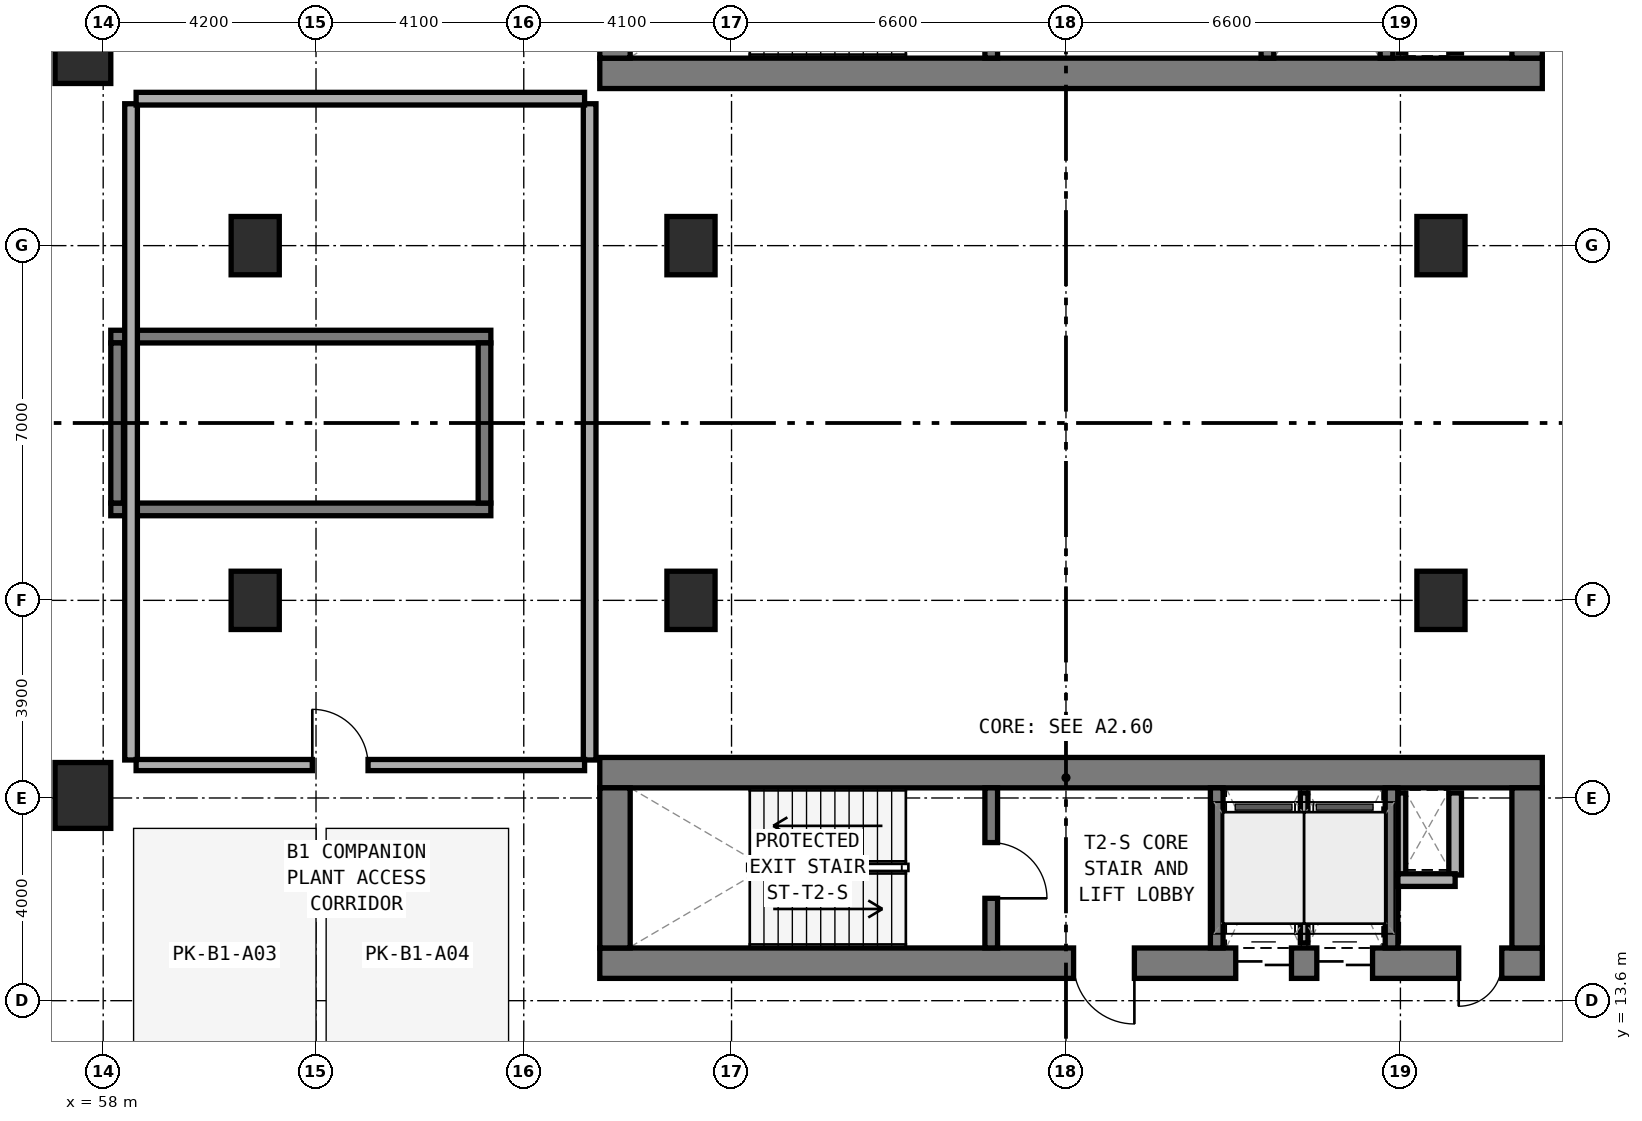
"""IFC4 building model, lengths in metres.
Left out: names, types, materials, properties, quantities, classifications, styles, units other than length and angle.
Written with IfcOpenShell. Run it as: python <this file> out.ifc"""

import sys

from ifc_helpers import new_model, si_unit, direction, frame, frame_2d, origin, origin_2d, place, context, subcontext, project, spatial, rectangle, extrude, element, fill, save


model = new_model("IFC4")
c1 = context("Model", 3, precision=1e-05, world=origin(), true_north=direction((0.0, 1.0)))
c2 = subcontext(c1, "Body", "Model", "MODEL_VIEW")
j1 = project(units=[si_unit("LENGTHUNIT", "METRE"), si_unit("PLANEANGLEUNIT", "RADIAN")], contexts=[c1])
p1 = place(None, origin())
s1 = spatial("IfcSite", under=j1, at=p1, CompositionType="ELEMENT")
p2 = place(p1, origin())
s2 = spatial("IfcBuilding", under=s1, at=p2, CompositionType="ELEMENT")
p3 = place(p2, frame((0.0, 0.0, -4.2)))
s3 = spatial("IfcBuildingStorey", under=s2, at=p3, CompositionType="ELEMENT", Elevation=-4.2)
p4 = place(p3, frame((67.8, 31.9, 0.0), z_axis=(0.0, 0.0, 1.0), x_axis=(1.0, 0.0, 0.0)))
e1 = element("IfcWall", 1, at=p4, inside=s3, PredefinedType="SHEAR", context=c2, shape_type="SweptSolid", body=[
    extrude(rectangle(XDim=18.6, YDim=0.6, at=frame_2d((9.3, 0.0))), origin(), (0.0, 0.0, 1.0), 4.2),
])
for number, where, z_axis, x_axis in (
    (2, (68.1, 32.2, 0.0), (0.0, 0.0, 1.0), (0.0, 1.0, 0.0)),
    (3, (86.1, 32.2, 0.0), (0.0, 0.0, 1.0), (0.0, 1.0, 0.0)),
):
    element("IfcWall", number, at=place(p3, frame(where, z_axis=z_axis, x_axis=x_axis)), inside=s3, PredefinedType="SHEAR", context=c2, shape_type="SweptSolid", body=[
        extrude(rectangle(XDim=3.16, YDim=0.6, at=frame_2d((1.58, 0.0))), origin(), (0.0, 0.0, 1.0), 4.2),
    ])
p5 = place(p3, frame((75.525, 32.2, 0.0), z_axis=(0.0, 0.0, 1.0), x_axis=(0.0, 1.0, 0.0)))
e4 = element("IfcWall", 4, at=p5, inside=s3, PredefinedType="STANDARD", context=c2, shape_type="SweptSolid", body=[
    extrude(rectangle(XDim=3.16, YDim=0.25, at=frame_2d((1.58, 0.0))), origin(), (0.0, 0.0, 1.0), 3.85),
])
p6 = place(p5, frame((0.98, 0.0, 0.0)))
e5 = element("IfcOpeningElement", 5, at=p6, cuts=e4, PredefinedType="OPENING", context=c2, shape_type="SweptSolid", body=[
    extrude(rectangle(XDim=1.1, YDim=2.15, at=frame_2d((0.55, 1.075))), frame((0.0, 0.135, 0.0), z_axis=(0.0, -1.0, 0.0), x_axis=(1.0, 0.0, 0.0)), (0.0, 0.0, 1.0), 0.27),
])
p7 = place(p3, frame((80.975, 32.2, 0.0), z_axis=(0.0, 0.0, 1.0), x_axis=(0.0, 1.0, 0.0)))
e6 = element("IfcWall", 6, at=p7, inside=s3, PredefinedType="STANDARD", context=c2, shape_type="SweptSolid", body=[
    extrude(rectangle(XDim=3.16, YDim=0.25, at=frame_2d((1.58, 0.0))), origin(), (0.0, 0.0, 1.0), 3.85),
])
p8 = place(p7, frame((0.98, 0.0, 0.0)))
e7 = element("IfcOpeningElement", 7, at=p8, cuts=e6, PredefinedType="OPENING", context=c2, shape_type="SweptSolid", body=[
    extrude(rectangle(XDim=1.1, YDim=2.15, at=frame_2d((0.55, 1.075))), frame((0.0, 0.135, 0.0), z_axis=(0.0, -1.0, 0.0), x_axis=(1.0, 0.0, 0.0)), (0.0, 0.0, 1.0), 0.27),
])
p9 = place(p3, frame((83.325, 32.2, 0.0), z_axis=(0.0, 0.0, 1.0), x_axis=(0.0, 1.0, 0.0)))
e8 = element("IfcWall", 8, at=p9, inside=s3, PredefinedType="STANDARD", context=c2, shape_type="SweptSolid", body=[
    extrude(rectangle(XDim=3.16, YDim=0.25, at=frame_2d((1.58, 0.0))), origin(), (0.0, 0.0, 1.0), 3.85),
])
p10 = place(p3, frame((67.8, 14.34, 0.0), z_axis=(0.0, 0.0, 1.0), x_axis=(1.0, 0.0, 0.0)))
e9 = element("IfcWall", 9, at=p10, inside=s3, PredefinedType="SHEAR", context=c2, shape_type="SweptSolid", body=[
    extrude(rectangle(XDim=18.6, YDim=0.6, at=frame_2d((9.3, 0.0))), origin(), (0.0, 0.0, 1.0), 4.2),
])
p11 = place(p10, frame((9.35, 0.0, 0.0)))
e10 = element("IfcOpeningElement", 10, at=p11, cuts=e9, PredefinedType="OPENING", context=c2, shape_type="SweptSolid", body=[
    extrude(rectangle(XDim=1.2, YDim=2.15, at=frame_2d((0.6, 1.075))), frame((0.0, 0.31, 0.0), z_axis=(0.0, -1.0, 0.0), x_axis=(1.0, 0.0, 0.0)), (0.0, 0.0, 1.0), 0.62),
])
p12 = place(p10, frame((16.95, 0.0, 0.0)))
e11 = element("IfcOpeningElement", 11, at=p12, cuts=e9, PredefinedType="OPENING", context=c2, shape_type="SweptSolid", body=[
    extrude(rectangle(XDim=0.85, YDim=2.1, at=frame_2d((0.425, 1.05))), frame((0.0, 0.31, 0.0), z_axis=(0.0, -1.0, 0.0), x_axis=(1.0, 0.0, 0.0)), (0.0, 0.0, 1.0), 0.62),
])
p13 = place(p10, frame((12.55, 0.0, 0.0)))
e12 = element("IfcOpeningElement", 12, at=p13, cuts=e9, PredefinedType="OPENING", context=c2, shape_type="SweptSolid", body=[
    extrude(rectangle(XDim=1.1, YDim=2.15, at=frame_2d((0.55, 1.075))), frame((0.0, 0.31, 0.0), z_axis=(0.0, -1.0, 0.0), x_axis=(1.0, 0.0, 0.0)), (0.0, 0.0, 1.0), 0.62),
])
p14 = place(p10, frame((14.15, 0.0, 0.0)))
e13 = element("IfcOpeningElement", 13, at=p14, cuts=e9, PredefinedType="OPENING", context=c2, shape_type="SweptSolid", body=[
    extrude(rectangle(XDim=1.1, YDim=2.15, at=frame_2d((0.55, 1.075))), frame((0.0, 0.31, 0.0), z_axis=(0.0, -1.0, 0.0), x_axis=(1.0, 0.0, 0.0)), (0.0, 0.0, 1.0), 0.62),
])
p15 = place(p3, frame((67.8, 18.1, 0.0), z_axis=(0.0, 0.0, 1.0), x_axis=(1.0, 0.0, 0.0)))
e14 = element("IfcWall", 14, at=p15, inside=s3, PredefinedType="SHEAR", context=c2, shape_type="SweptSolid", body=[
    extrude(rectangle(XDim=18.6, YDim=0.6, at=frame_2d((9.3, 0.0))), origin(), (0.0, 0.0, 1.0), 4.2),
])
for number, where, z_axis, x_axis in (
    (15, (68.1, 14.64, 0.0), (0.0, 0.0, 1.0), (0.0, 1.0, 0.0)),
    (16, (86.1, 14.64, 0.0), (0.0, 0.0, 1.0), (0.0, 1.0, 0.0)),
):
    element("IfcWall", number, at=place(p3, frame(where, z_axis=z_axis, x_axis=x_axis)), inside=s3, PredefinedType="SHEAR", context=c2, shape_type="SweptSolid", body=[
        extrude(rectangle(XDim=3.16, YDim=0.6, at=frame_2d((1.58, 0.0))), origin(), (0.0, 0.0, 1.0), 4.2),
    ])
p16 = place(p3, frame((75.525, 14.64, 0.0), z_axis=(0.0, 0.0, 1.0), x_axis=(0.0, 1.0, 0.0)))
e17 = element("IfcWall", 17, at=p16, inside=s3, PredefinedType="STANDARD", context=c2, shape_type="SweptSolid", body=[
    extrude(rectangle(XDim=3.16, YDim=0.25, at=frame_2d((1.58, 0.0))), origin(), (0.0, 0.0, 1.0), 3.85),
])
p17 = place(p16, frame((0.98, 0.0, 0.0)))
e18 = element("IfcOpeningElement", 18, at=p17, cuts=e17, PredefinedType="OPENING", context=c2, shape_type="SweptSolid", body=[
    extrude(rectangle(XDim=1.1, YDim=2.15, at=frame_2d((0.55, 1.075))), frame((0.0, 0.135, 0.0), z_axis=(0.0, -1.0, 0.0), x_axis=(1.0, 0.0, 0.0)), (0.0, 0.0, 1.0), 0.27),
])
for number, where, z_axis, x_axis in (
    (19, (79.975, 14.64, 0.0), (0.0, 0.0, 1.0), (0.0, 1.0, 0.0)),
    (20, (83.425, 14.64, 0.0), (0.0, 0.0, 1.0), (0.0, 1.0, 0.0)),
):
    element("IfcWall", number, at=place(p3, frame(where, z_axis=z_axis, x_axis=x_axis)), inside=s3, PredefinedType="STANDARD", context=c2, shape_type="SweptSolid", body=[
        extrude(rectangle(XDim=3.16, YDim=0.25, at=frame_2d((1.58, 0.0))), origin(), (0.0, 0.0, 1.0), 3.85),
    ])
for number, where, z_axis, x_axis in (
    (21, (58.15, 23.295, 0.0), (0.0, 0.0, 1.0), (1.0, 0.0, 0.0)),
    (22, (58.15, 26.705, 0.0), (0.0, 0.0, 1.0), (1.0, 0.0, 0.0)),
):
    element("IfcWall", number, at=place(p3, frame(where, z_axis=z_axis, x_axis=x_axis)), inside=s3, PredefinedType="STANDARD", context=c2, shape_type="SweptSolid", body=[
        extrude(rectangle(XDim=7.5, YDim=0.25, at=frame_2d((3.75, 0.0))), origin(), (0.0, 0.0, 1.0), 4.2),
    ])
for number, where, z_axis, x_axis in (
    (23, (58.275, 23.42, 0.0), (0.0, 0.0, 1.0), (0.0, 1.0, 0.0)),
    (24, (65.525, 23.42, 0.0), (0.0, 0.0, 1.0), (0.0, 1.0, 0.0)),
):
    element("IfcWall", number, at=place(p3, frame(where, z_axis=z_axis, x_axis=x_axis)), inside=s3, PredefinedType="STANDARD", context=c2, shape_type="SweptSolid", body=[
        extrude(rectangle(XDim=3.16, YDim=0.25, at=frame_2d((1.58, 0.0))), origin(), (0.0, 0.0, 1.0), 4.2),
    ])
for number, where, z_axis, x_axis in (
    (25, (61.0, 21.5, 0.0), (0.0, 0.0, 1.0), (1.0, 0.0, 0.0)),
    (26, (61.0, 28.5, 0.0), (0.0, 0.0, 1.0), (1.0, 0.0, 0.0)),
    (27, (69.6, 21.5, 0.0), (0.0, 0.0, 1.0), (1.0, 0.0, 0.0)),
    (28, (69.6, 28.5, 0.0), (0.0, 0.0, 1.0), (1.0, 0.0, 0.0)),
    (29, (84.4, 21.5, 0.0), (0.0, 0.0, 1.0), (1.0, 0.0, 0.0)),
    (30, (84.4, 28.5, 0.0), (0.0, 0.0, 1.0), (1.0, 0.0, 0.0)),
):
    element("IfcColumn", number, at=place(p3, frame(where, z_axis=z_axis, x_axis=x_axis)), inside=s3, PredefinedType="COLUMN", context=c2, shape_type="SweptSolid", body=[
        extrude(rectangle(XDim=0.95, YDim=1.15, at=origin_2d()), origin(), (0.0, 0.0, 1.0), 4.2),
    ])
for number, where, z_axis, x_axis in (
    (31, (57.6, 17.65, 0.0), (0.0, 0.0, 1.0), (1.0, 0.0, 0.0)),
    (32, (57.6, 32.35, 0.0), (0.0, 0.0, 1.0), (1.0, 0.0, 0.0)),
):
    element("IfcColumn", number, at=place(p3, frame(where, z_axis=z_axis, x_axis=x_axis)), inside=s3, PredefinedType="COLUMN", context=c2, shape_type="SweptSolid", body=[
        extrude(rectangle(XDim=1.1, YDim=1.3, at=origin_2d()), origin(), (0.0, 0.0, 1.0), 4.2),
    ])
p18 = place(p3, frame((83.63, 32.3, 0.0), z_axis=(0.0, 0.0, 1.0), x_axis=(0.0, 1.0, 0.0)))
e33 = element("IfcWall", 33, at=p18, inside=s3, PredefinedType="PARTITIONING", context=c2, shape_type="SweptSolid", body=[
    extrude(rectangle(XDim=1.62, YDim=0.15, at=frame_2d((0.81, 0.0))), origin(), (0.0, 0.0, 1.0), 3.325),
])
p19 = place(p3, frame((84.68, 32.3, 0.0), z_axis=(0.0, 0.0, 1.0), x_axis=(0.0, 1.0, 0.0)))
e34 = element("IfcWall", 34, at=p19, inside=s3, PredefinedType="SOLIDWALL", context=c2, shape_type="SweptSolid", body=[
    extrude(rectangle(XDim=1.62, YDim=0.25, at=frame_2d((0.81, 0.0))), origin(), (0.0, 0.0, 1.0), 3.85),
])
p20 = place(p3, frame((83.63, 16.08, 0.0), z_axis=(0.0, 0.0, 1.0), x_axis=(0.0, 1.0, 0.0)))
e35 = element("IfcWall", 35, at=p20, inside=s3, PredefinedType="PARTITIONING", context=c2, shape_type="SweptSolid", body=[
    extrude(rectangle(XDim=1.62, YDim=0.15, at=frame_2d((0.81, 0.0))), origin(), (0.0, 0.0, 1.0), 3.325),
])
p21 = place(p3, frame((84.68, 16.08, 0.0), z_axis=(0.0, 0.0, 1.0), x_axis=(0.0, 1.0, 0.0)))
e36 = element("IfcWall", 36, at=p21, inside=s3, PredefinedType="SOLIDWALL", context=c2, shape_type="SweptSolid", body=[
    extrude(rectangle(XDim=1.62, YDim=0.25, at=frame_2d((0.81, 0.0))), origin(), (0.0, 0.0, 1.0), 3.85),
])
p22 = place(p3, frame((83.55, 15.98, 0.0), z_axis=(0.0, 0.0, 1.0), x_axis=(1.0, 0.0, 0.0)))
e37 = element("IfcWall", 37, at=p22, inside=s3, PredefinedType="SOLIDWALL", context=c2, shape_type="SweptSolid", body=[
    extrude(rectangle(XDim=1.13, YDim=0.25, at=frame_2d((0.565, 0.0))), origin(), (0.0, 0.0, 1.0), 3.85),
])
p23 = place(p3, frame((81.7, 14.74, 0.0), z_axis=(0.0, 0.0, 1.0), x_axis=(0.0, 1.0, 0.0)))
e38 = element("IfcWall", 38, at=p23, inside=s3, PredefinedType="PARTITIONING", context=c2, shape_type="SweptSolid", body=[
    extrude(rectangle(XDim=2.96, YDim=0.15, at=frame_2d((1.48, 0.0))), origin(), (0.0, 0.0, 1.0), 3.85),
])
p24 = place(p3, frame((58.55, 18.35, 0.0), z_axis=(0.0, 0.0, 1.0), x_axis=(0.0, 1.0, 0.0)))
e39 = element("IfcWall", 39, at=p24, inside=s3, PredefinedType="SOLIDWALL", context=c2, shape_type="SweptSolid", body=[
    extrude(rectangle(XDim=12.95, YDim=0.25, at=frame_2d((6.475, 0.0))), origin(), (0.0, 0.0, 1.0), 3.85),
])
p25 = place(p3, frame((67.6, 18.35, 0.0), z_axis=(0.0, 0.0, 1.0), x_axis=(0.0, 1.0, 0.0)))
e40 = element("IfcWall", 40, at=p25, inside=s3, PredefinedType="SOLIDWALL", context=c2, shape_type="SweptSolid", body=[
    extrude(rectangle(XDim=12.95, YDim=0.25, at=frame_2d((6.475, 0.0))), origin(), (0.0, 0.0, 1.0), 3.325),
])
p26 = place(p3, frame((58.65, 31.4, 0.0), z_axis=(0.0, 0.0, 1.0), x_axis=(1.0, 0.0, 0.0)))
e41 = element("IfcWall", 41, at=p26, inside=s3, PredefinedType="SOLIDWALL", context=c2, shape_type="SweptSolid", body=[
    extrude(rectangle(XDim=8.85, YDim=0.25, at=frame_2d((4.425, 0.0))), origin(), (0.0, 0.0, 1.0), 3.465),
])
p27 = place(p3, frame((58.65, 18.25, 0.0), z_axis=(0.0, 0.0, 1.0), x_axis=(1.0, 0.0, 0.0)))
e42 = element("IfcWall", 42, at=p27, inside=s3, PredefinedType="SOLIDWALL", context=c2, shape_type="SweptSolid", body=[
    extrude(rectangle(XDim=8.85, YDim=0.22, at=frame_2d((4.425, 0.0))), origin(), (0.0, 0.0, 1.0), 3.465),
])
p28 = place(p27, frame((3.477, 0.0, 0.0)))
e43 = element("IfcOpeningElement", 43, at=p28, cuts=e42, PredefinedType="OPENING", context=c2, shape_type="SweptSolid", body=[
    extrude(rectangle(XDim=1.1, YDim=2.1, at=frame_2d((0.55, 1.05))), frame((0.0, 0.12, 0.0), z_axis=(0.0, -1.0, 0.0), x_axis=(1.0, 0.0, 0.0)), (0.0, 0.0, 1.0), 0.24),
])
p29 = place(p17, frame((1.1, 0.0, 0.0), z_axis=(0.0, 0.0, 1.0), x_axis=(-1.0, 0.0, 0.0)))
e44 = element("IfcDoor", 44, at=p29, inside=s3, OperationType="SINGLE_SWING_RIGHT", PredefinedType="DOOR", context=c2, shape_type="SweptSolid", body=[
    extrude(rectangle(XDim=1.1, YDim=2.15, at=frame_2d((0.55, 1.075))), frame((0.0, 0.025, 0.0), z_axis=(0.0, -1.0, 0.0), x_axis=(1.0, 0.0, 0.0)), (0.0, 0.0, 1.0), 0.05),
])
fill(e18, e44)
p30 = place(p11, frame((1.2, 0.0, 0.0), z_axis=(0.0, 0.0, 1.0), x_axis=(-1.0, 0.0, 0.0)))
e45 = element("IfcDoor", 45, at=p30, inside=s3, OperationType="SINGLE_SWING_LEFT", PredefinedType="DOOR", context=c2, shape_type="SweptSolid", body=[
    extrude(rectangle(XDim=1.2, YDim=2.15, at=frame_2d((0.6, 1.075))), frame((0.0, 0.025, 0.0), z_axis=(0.0, -1.0, 0.0), x_axis=(1.0, 0.0, 0.0)), (0.0, 0.0, 1.0), 0.05),
])
fill(e10, e45)
p31 = place(p12, frame((0.85, 0.0, 0.0), z_axis=(0.0, 0.0, 1.0), x_axis=(-1.0, 0.0, 0.0)))
e46 = element("IfcDoor", 46, at=p31, inside=s3, OperationType="SINGLE_SWING_RIGHT", PredefinedType="DOOR", context=c2, shape_type="SweptSolid", body=[
    extrude(rectangle(XDim=0.85, YDim=2.1, at=frame_2d((0.425, 1.05))), frame((0.0, 0.025, 0.0), z_axis=(0.0, -1.0, 0.0), x_axis=(1.0, 0.0, 0.0)), (0.0, 0.0, 1.0), 0.05),
])
fill(e11, e46)
p32 = place(p13, frame((1.1, 0.0, 0.0), z_axis=(0.0, 0.0, 1.0), x_axis=(-1.0, 0.0, 0.0)))
e47 = element("IfcDoor", 47, at=p32, inside=s3, OperationType="DOUBLE_DOOR_SLIDING", PredefinedType="DOOR", context=c2, shape_type="SweptSolid", body=[
    extrude(rectangle(XDim=1.1, YDim=2.15, at=frame_2d((0.55, 1.075))), frame((0.0, 0.025, 0.0), z_axis=(0.0, -1.0, 0.0), x_axis=(1.0, 0.0, 0.0)), (0.0, 0.0, 1.0), 0.05),
])
fill(e12, e47)
p33 = place(p14, frame((1.1, 0.0, 0.0), z_axis=(0.0, 0.0, 1.0), x_axis=(-1.0, 0.0, 0.0)))
e48 = element("IfcDoor", 48, at=p33, inside=s3, OperationType="DOUBLE_DOOR_SLIDING", PredefinedType="DOOR", context=c2, shape_type="SweptSolid", body=[
    extrude(rectangle(XDim=1.1, YDim=2.15, at=frame_2d((0.55, 1.075))), frame((0.0, 0.025, 0.0), z_axis=(0.0, -1.0, 0.0), x_axis=(1.0, 0.0, 0.0)), (0.0, 0.0, 1.0), 0.05),
])
fill(e13, e48)
p34 = place(p28, origin())
e49 = element("IfcDoor", 49, at=p34, inside=s3, OperationType="SINGLE_SWING_LEFT", PredefinedType="DOOR", context=c2, shape_type="SweptSolid", body=[
    extrude(rectangle(XDim=1.1, YDim=2.1, at=frame_2d((0.55, 1.05))), frame((0.0, 0.025, 0.0), z_axis=(0.0, -1.0, 0.0), x_axis=(1.0, 0.0, 0.0)), (0.0, 0.0, 1.0), 0.05),
])
fill(e43, e49)
save(model, sys.argv[1])
